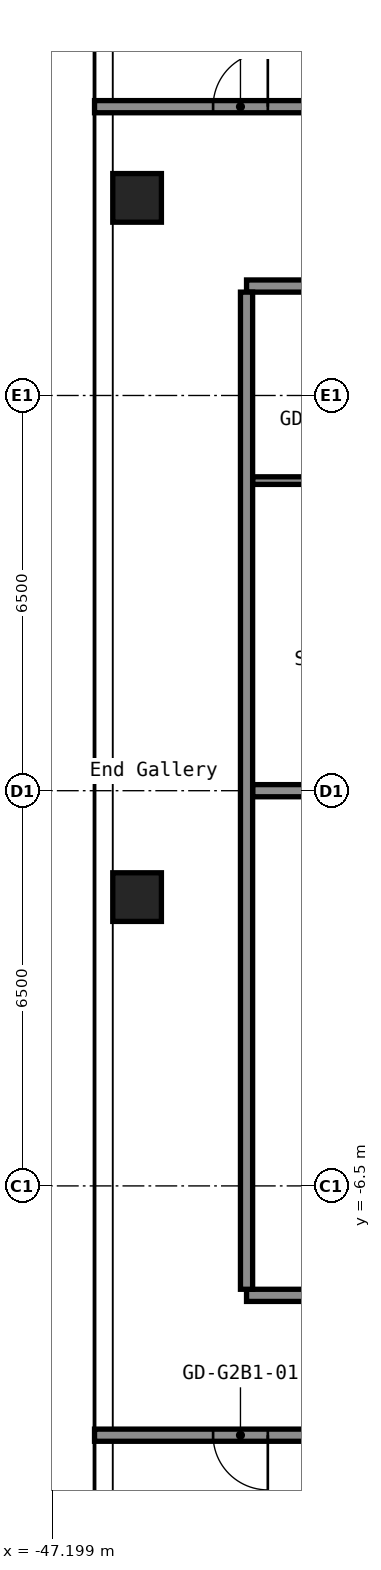
"""IFC4 building model, lengths in metres.
Left out: names, types, materials, properties, quantities, classifications, styles, units other than length and angle.
Written with IfcOpenShell. Run it as: python <this file> out.ifc"""

import sys

from ifc_helpers import new_model, si_unit, direction, frame, frame_2d, origin, origin_2d, place, context, subcontext, project, spatial, rectangle, hollow_rectangle, extrude, element, fill, save


model = new_model("IFC4")
c1 = context("Model", 3, precision=1e-05, world=origin(), true_north=direction((0.0, 1.0)))
c2 = subcontext(c1, "Body", "Model", "MODEL_VIEW")
j1 = project(units=[si_unit("LENGTHUNIT", "METRE"), si_unit("PLANEANGLEUNIT", "RADIAN")], contexts=[c1])
p1 = place(None, origin())
s1 = spatial("IfcSite", under=j1, at=p1, CompositionType="ELEMENT")
p2 = place(p1, origin())
s2 = spatial("IfcBuilding", under=s1, at=p2, CompositionType="ELEMENT")
p3 = place(p2, frame((0.0, 0.0, 94.6)))
s3 = spatial("IfcBuildingStorey", under=s2, at=p3, CompositionType="ELEMENT", Elevation=94.6)
for number, where, z_axis, x_axis in (
    (1, (-45.8, -1.75, 0.0), (0.0, 0.0, 1.0), (1.0, 0.0, 0.0)),
    (2, (-45.8, 9.75, 0.0), (0.0, 0.0, 1.0), (1.0, 0.0, 0.0)),
):
    element("IfcColumn", number, at=place(p3, frame(where, z_axis=z_axis, x_axis=x_axis)), inside=s3, PredefinedType="COLUMN", context=c2, shape_type="SweptSolid", body=[
        extrude(hollow_rectangle(XDim=0.8, YDim=0.8, WallThickness=0.032, at=origin_2d()), origin(), (0.0, 0.0, 1.0), 2.8),
    ])
p4 = place(p3, frame((-46.5, -10.6, 0.0), z_axis=(0.0, 0.0, 1.0), x_axis=(1.0, 0.0, 0.0)))
e3 = element("IfcWall", 3, at=p4, inside=s3, PredefinedType="PARTITIONING", context=c2, shape_type="SweptSolid", body=[
    extrude(rectangle(XDim=29.7, YDim=0.2, at=frame_2d((14.85, 0.0))), origin(), (0.0, 0.0, 1.0), 2.8),
])
p5 = place(p4, frame((1.95, 0.0, 0.0)))
e4 = element("IfcOpeningElement", 4, at=p5, cuts=e3, PredefinedType="OPENING", context=c2, shape_type="SweptSolid", body=[
    extrude(rectangle(XDim=0.9, YDim=2.1, at=frame_2d((0.45, 1.05))), frame((0.0, 0.11, 0.0), z_axis=(0.0, -1.0, 0.0), x_axis=(1.0, 0.0, 0.0)), (0.0, 0.0, 1.0), 0.22),
])
p6 = place(p4, frame((6.32, 0.0, 0.0)))
e5 = element("IfcOpeningElement", 5, at=p6, cuts=e3, PredefinedType="OPENING", context=c2, shape_type="SweptSolid", body=[
    extrude(rectangle(XDim=0.9, YDim=2.1, at=frame_2d((0.45, 1.05))), frame((0.0, 0.11, 0.0), z_axis=(0.0, -1.0, 0.0), x_axis=(1.0, 0.0, 0.0)), (0.0, 0.0, 1.0), 0.22),
])
p7 = place(p4, frame((10.52, 0.0, 0.0)))
e6 = element("IfcOpeningElement", 6, at=p7, cuts=e3, PredefinedType="OPENING", context=c2, shape_type="SweptSolid", body=[
    extrude(rectangle(XDim=0.9, YDim=2.1, at=frame_2d((0.45, 1.05))), frame((0.0, 0.11, 0.0), z_axis=(0.0, -1.0, 0.0), x_axis=(1.0, 0.0, 0.0)), (0.0, 0.0, 1.0), 0.22),
])
p8 = place(p4, frame((16.6, 0.0, 0.0)))
e7 = element("IfcOpeningElement", 7, at=p8, cuts=e3, PredefinedType="OPENING", context=c2, shape_type="SweptSolid", body=[
    extrude(rectangle(XDim=1.0, YDim=2.1, at=frame_2d((0.5, 1.05))), frame((0.0, 0.11, 0.0), z_axis=(0.0, -1.0, 0.0), x_axis=(1.0, 0.0, 0.0)), (0.0, 0.0, 1.0), 0.22),
])
p9 = place(p4, frame((23.37, 0.0, 0.0)))
e8 = element("IfcOpeningElement", 8, at=p9, cuts=e3, PredefinedType="OPENING", context=c2, shape_type="SweptSolid", body=[
    extrude(rectangle(XDim=0.9, YDim=2.1, at=frame_2d((0.45, 1.05))), frame((0.0, 0.11, 0.0), z_axis=(0.0, -1.0, 0.0), x_axis=(1.0, 0.0, 0.0)), (0.0, 0.0, 1.0), 0.22),
])
p10 = place(p4, frame((27.57, 0.0, 0.0)))
e9 = element("IfcOpeningElement", 9, at=p10, cuts=e3, PredefinedType="OPENING", context=c2, shape_type="SweptSolid", body=[
    extrude(rectangle(XDim=0.9, YDim=2.1, at=frame_2d((0.45, 1.05))), frame((0.0, 0.11, 0.0), z_axis=(0.0, -1.0, 0.0), x_axis=(1.0, 0.0, 0.0)), (0.0, 0.0, 1.0), 0.22),
])
p11 = place(p3, frame((-44.0, -8.3, 0.0), z_axis=(0.0, 0.0, 1.0), x_axis=(1.0, 0.0, 0.0)))
e10 = element("IfcWall", 10, at=p11, inside=s3, PredefinedType="PARTITIONING", context=c2, shape_type="SweptSolid", body=[
    extrude(rectangle(XDim=10.4, YDim=0.2, at=frame_2d((5.2, 0.0))), origin(), (0.0, 0.0, 1.0), 2.8),
])
p12 = place(p11, frame((3.05, 0.0, 0.0)))
e11 = element("IfcOpeningElement", 11, at=p12, cuts=e10, PredefinedType="OPENING", context=c2, shape_type="SweptSolid", body=[
    extrude(rectangle(XDim=1.0, YDim=2.1, at=frame_2d((0.5, 1.05))), frame((0.0, 0.11, 0.0), z_axis=(0.0, -1.0, 0.0), x_axis=(1.0, 0.0, 0.0)), (0.0, 0.0, 1.0), 0.22),
])
p13 = place(p3, frame((-43.9, 0.0, 0.0), z_axis=(0.0, 0.0, 1.0), x_axis=(1.0, 0.0, 0.0)))
e12 = element("IfcWall", 12, at=p13, inside=s3, PredefinedType="PARTITIONING", context=c2, shape_type="SweptSolid", body=[
    extrude(rectangle(XDim=10.3, YDim=0.2, at=frame_2d((5.15, 0.0))), origin(), (0.0, 0.0, 1.0), 2.8),
])
p14 = place(p3, frame((-43.9, 5.1, 0.0), z_axis=(0.0, 0.0, 1.0), x_axis=(1.0, 0.0, 0.0)))
e13 = element("IfcWall", 13, at=p14, inside=s3, PredefinedType="PARTITIONING", context=c2, shape_type="SweptSolid", body=[
    extrude(rectangle(XDim=2.837, YDim=0.125, at=frame_2d((1.419, 0.0))), origin(), (0.0, 0.0, 1.0), 2.8),
])
p15 = place(p14, frame((1.0, 0.0, 0.0)))
e14 = element("IfcOpeningElement", 14, at=p15, cuts=e13, PredefinedType="OPENING", context=c2, shape_type="SweptSolid", body=[
    extrude(rectangle(XDim=0.8, YDim=2.1, at=frame_2d((0.4, 1.05))), frame((0.0, 0.073, 0.0), z_axis=(0.0, -1.0, 0.0), x_axis=(1.0, 0.0, 0.0)), (0.0, 0.0, 1.0), 0.145),
])
p16 = place(p3, frame((-44.0, 8.3, 0.0), z_axis=(0.0, 0.0, 1.0), x_axis=(1.0, 0.0, 0.0)))
e15 = element("IfcWall", 15, at=p16, inside=s3, PredefinedType="PARTITIONING", context=c2, shape_type="SweptSolid", body=[
    extrude(rectangle(XDim=10.4, YDim=0.2, at=frame_2d((5.2, 0.0))), origin(), (0.0, 0.0, 1.0), 2.8),
])
p17 = place(p16, frame((7.3, 0.0, 0.0)))
e16 = element("IfcOpeningElement", 16, at=p17, cuts=e15, PredefinedType="OPENING", context=c2, shape_type="SweptSolid", body=[
    extrude(rectangle(XDim=1.0, YDim=2.1, at=frame_2d((0.5, 1.05))), frame((0.0, 0.11, 0.0), z_axis=(0.0, -1.0, 0.0), x_axis=(1.0, 0.0, 0.0)), (0.0, 0.0, 1.0), 0.22),
])
p18 = place(p3, frame((-46.5, 11.25, 0.0), z_axis=(0.0, 0.0, 1.0), x_axis=(1.0, 0.0, 0.0)))
e17 = element("IfcWall", 17, at=p18, inside=s3, PredefinedType="PARTITIONING", context=c2, shape_type="SweptSolid", body=[
    extrude(rectangle(XDim=29.7, YDim=0.2, at=frame_2d((14.85, 0.0))), origin(), (0.0, 0.0, 1.0), 2.8),
])
p19 = place(p18, frame((1.95, 0.0, 0.0)))
e18 = element("IfcOpeningElement", 18, at=p19, cuts=e17, PredefinedType="OPENING", context=c2, shape_type="SweptSolid", body=[
    extrude(rectangle(XDim=0.9, YDim=2.1, at=frame_2d((0.45, 1.05))), frame((0.0, 0.11, 0.0), z_axis=(0.0, -1.0, 0.0), x_axis=(1.0, 0.0, 0.0)), (0.0, 0.0, 1.0), 0.22),
])
p20 = place(p18, frame((7.35, 0.0, 0.0)))
e19 = element("IfcOpeningElement", 19, at=p20, cuts=e17, PredefinedType="OPENING", context=c2, shape_type="SweptSolid", body=[
    extrude(rectangle(XDim=1.0, YDim=2.1, at=frame_2d((0.5, 1.05))), frame((0.0, 0.11, 0.0), z_axis=(0.0, -1.0, 0.0), x_axis=(1.0, 0.0, 0.0)), (0.0, 0.0, 1.0), 0.22),
])
p21 = place(p18, frame((9.05, 0.0, 0.0)))
e20 = element("IfcOpeningElement", 20, at=p21, cuts=e17, PredefinedType="OPENING", context=c2, shape_type="SweptSolid", body=[
    extrude(rectangle(XDim=1.0, YDim=2.1, at=frame_2d((0.5, 1.05))), frame((0.0, 0.11, 0.0), z_axis=(0.0, -1.0, 0.0), x_axis=(1.0, 0.0, 0.0)), (0.0, 0.0, 1.0), 0.22),
])
p22 = place(p18, frame((15.75, 0.0, 0.0)))
e21 = element("IfcOpeningElement", 21, at=p22, cuts=e17, PredefinedType="OPENING", context=c2, shape_type="SweptSolid", body=[
    extrude(rectangle(XDim=1.0, YDim=2.1, at=frame_2d((0.5, 1.05))), frame((0.0, 0.11, 0.0), z_axis=(0.0, -1.0, 0.0), x_axis=(1.0, 0.0, 0.0)), (0.0, 0.0, 1.0), 0.22),
])
p23 = place(p18, frame((17.45, 0.0, 0.0)))
e22 = element("IfcOpeningElement", 22, at=p23, cuts=e17, PredefinedType="OPENING", context=c2, shape_type="SweptSolid", body=[
    extrude(rectangle(XDim=1.0, YDim=2.1, at=frame_2d((0.5, 1.05))), frame((0.0, 0.11, 0.0), z_axis=(0.0, -1.0, 0.0), x_axis=(1.0, 0.0, 0.0)), (0.0, 0.0, 1.0), 0.22),
])
p24 = place(p18, frame((23.2, 0.0, 0.0)))
e23 = element("IfcOpeningElement", 23, at=p24, cuts=e17, PredefinedType="OPENING", context=c2, shape_type="SweptSolid", body=[
    extrude(rectangle(XDim=1.0, YDim=2.1, at=frame_2d((0.5, 1.05))), frame((0.0, 0.11, 0.0), z_axis=(0.0, -1.0, 0.0), x_axis=(1.0, 0.0, 0.0)), (0.0, 0.0, 1.0), 0.22),
])
p25 = place(p3, frame((-44.0, -8.2, 0.0), z_axis=(0.0, 0.0, 1.0), x_axis=(0.0, 1.0, 0.0)))
e24 = element("IfcWall", 24, at=p25, inside=s3, PredefinedType="PARTITIONING", context=c2, shape_type="SweptSolid", body=[
    extrude(rectangle(XDim=16.4, YDim=0.2, at=frame_2d((8.2, 0.0))), origin(), (0.0, 0.0, 1.0), 2.8),
])
p26 = place(p5, origin())
e25 = element("IfcDoor", 25, at=p26, inside=s3, OperationType="SINGLE_SWING_RIGHT", PredefinedType="DOOR", context=c2, shape_type="SweptSolid", body=[
    extrude(rectangle(XDim=0.9, YDim=2.1, at=frame_2d((0.45, 1.05))), frame((0.0, 0.025, 0.0), z_axis=(0.0, -1.0, 0.0), x_axis=(1.0, 0.0, 0.0)), (0.0, 0.0, 1.0), 0.05),
])
fill(e4, e25)
p27 = place(p19, origin())
e26 = element("IfcDoor", 26, at=p27, inside=s3, OperationType="SINGLE_SWING_LEFT", PredefinedType="DOOR", context=c2, shape_type="SweptSolid", body=[
    extrude(rectangle(XDim=0.9, YDim=2.1, at=frame_2d((0.45, 1.05))), frame((0.0, 0.025, 0.0), z_axis=(0.0, -1.0, 0.0), x_axis=(1.0, 0.0, 0.0)), (0.0, 0.0, 1.0), 0.05),
])
fill(e18, e26)
save(model, sys.argv[1])
